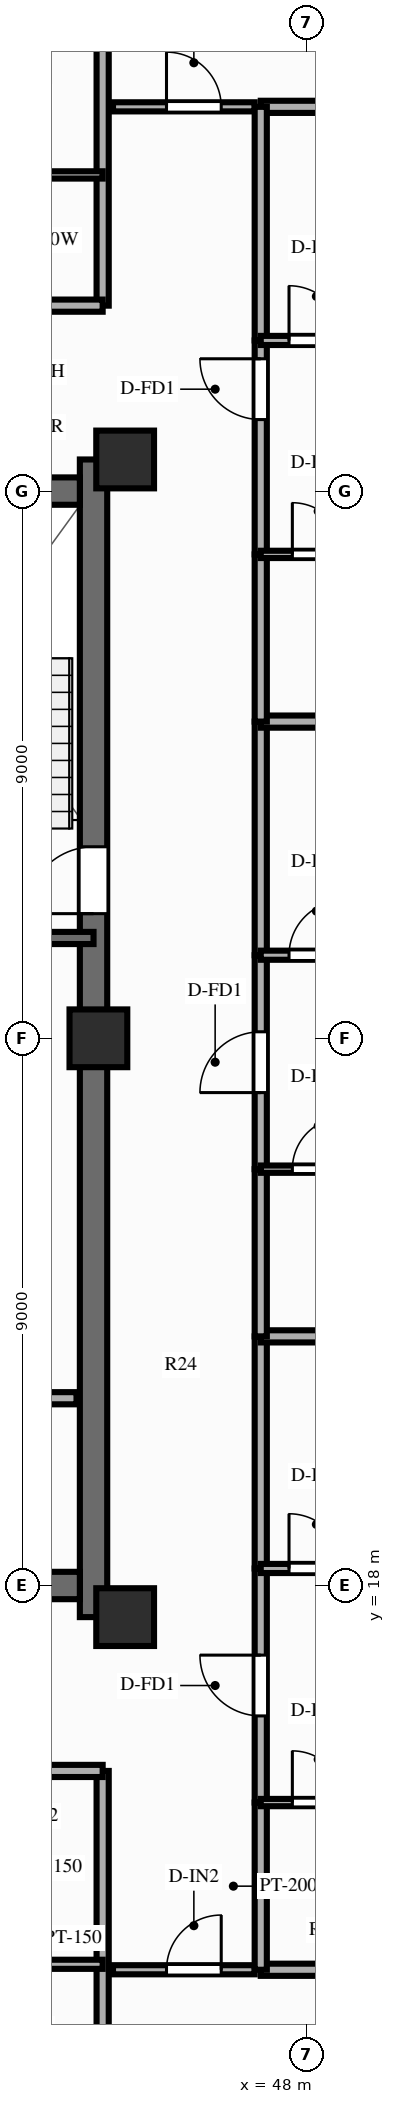
"""IFC4 building model, lengths in metres.
Left out: names, types, materials, properties, quantities, classifications, styles, units other than length and angle.
Written with IfcOpenShell. Run it as: python <this file> out.ifc"""

import sys

from ifc_helpers import new_model, si_unit, direction, frame, frame_2d, origin, origin_2d, place, context, subcontext, project, spatial, rectangle, extrude, source, transform, mapped, element, fill, save


model = new_model("IFC4")
c1 = context("Model", 3, precision=1e-05, world=origin(), true_north=direction((0.0, 1.0)))
c2 = subcontext(c1, "Body", "Model", "MODEL_VIEW")
j1 = project(units=[si_unit("LENGTHUNIT", "METRE"), si_unit("PLANEANGLEUNIT", "RADIAN")], contexts=[c1])
p1 = place(None, origin())
s1 = spatial("IfcSite", under=j1, at=p1, CompositionType="ELEMENT")
p2 = place(p1, origin())
s2 = spatial("IfcBuilding", under=s1, at=p2, CompositionType="ELEMENT")
p3 = place(p2, frame((0.0, 0.0, 216.3)))
s3 = spatial("IfcBuildingStorey", under=s2, at=p3, CompositionType="ELEMENT", Elevation=216.3)
p4 = place(p3, frame((44.5, 17.48, 0.0), z_axis=(0.0, 0.0, 1.0), x_axis=(0.0, 1.0, 0.0)))
e1 = element("IfcWall", 1, at=p4, inside=s3, PredefinedType="SHEAR", context=c2, shape_type="SweptSolid", body=[
    extrude(rectangle(XDim=19.04, YDim=0.45, at=frame_2d((9.52, 0.0))), origin(), (0.0, 0.0, 1.0), 3.9),
])
p5 = place(p4, frame((12.67, 0.0, 0.0), z_axis=(0.0, 0.0, 1.0), x_axis=(-1.0, 0.0, 0.0)))
e2 = element("IfcOpeningElement", 2, at=p5, cuts=e1, PredefinedType="OPENING", context=c2, shape_type="SweptSolid", body=[
    extrude(rectangle(XDim=1.1, YDim=2.15, at=frame_2d((0.55, 1.075))), frame((0.0, 0.237, 0.0), z_axis=(0.0, -1.0, 0.0), x_axis=(1.0, 0.0, 0.0)), (0.0, 0.0, 1.0), 0.474),
])
p6 = place(p3, frame((31.725, 18.0, 0.0), z_axis=(0.0, 0.0, 1.0), x_axis=(1.0, 0.0, 0.0)))
e3 = element("IfcWall", 3, at=p6, inside=s3, PredefinedType="SHEAR", context=c2, shape_type="SweptSolid", body=[
    extrude(rectangle(XDim=12.55, YDim=0.45, at=frame_2d((6.275, 0.0))), origin(), (0.0, 0.0, 1.0), 3.9),
])
p7 = place(p3, frame((31.725, 36.0, 0.0), z_axis=(0.0, 0.0, 1.0), x_axis=(1.0, 0.0, 0.0)))
e4 = element("IfcWall", 4, at=p7, inside=s3, PredefinedType="SHEAR", context=c2, shape_type="SweptSolid", body=[
    extrude(rectangle(XDim=12.55, YDim=0.45, at=frame_2d((6.275, 0.0))), origin(), (0.0, 0.0, 1.0), 3.9),
])
p8 = place(p7, frame((5.225, 0.0, 0.0), z_axis=(0.0, 0.0, 1.0), x_axis=(-1.0, 0.0, 0.0)))
e5 = element("IfcOpeningElement", 5, at=p8, cuts=e4, PredefinedType="OPENING", context=c2, shape_type="SweptSolid", body=[
    extrude(rectangle(XDim=1.4, YDim=2.15, at=frame_2d((0.7, 1.075))), frame((0.0, 0.237, 0.0), z_axis=(0.0, -1.0, 0.0), x_axis=(1.0, 0.0, 0.0)), (0.0, 0.0, 1.0), 0.474),
])
m1 = source(origin(), c2, "Body", "SweptSolid", [
    extrude(rectangle(XDim=0.95, YDim=0.95, at=origin_2d()), origin(), (0.0, 0.0, 1.0), 3.9),
])
for number, where, z_axis, x_axis in (
    (6, (45.02, 17.48, 0.0), (0.0, 0.0, 1.0), (1.0, 0.0, 0.0)),
    (7, (45.02, 36.52, 0.0), (0.0, 0.0, 1.0), (1.0, 0.0, 0.0)),
    (8, (44.58, 27.0, 0.0), (0.0, 0.0, 1.0), (1.0, 0.0, 0.0)),
):
    element("IfcColumn", number, at=place(p3, frame(where, z_axis=z_axis, x_axis=x_axis)), inside=s3, PredefinedType="COLUMN", context=c2, shape_type="MappedRepresentation", body=[
        mapped(m1, transform((0.0, 0.0, 0.0), scale=1.0)),
    ])
p9 = place(p3, frame((42.88, 21.08, 0.0), z_axis=(0.0, 0.0, 1.0), x_axis=(1.0, 0.0, 0.0)))
e9 = element("IfcWall", 9, at=p9, inside=s3, PredefinedType="PARTITIONING", context=c2, shape_type="SweptSolid", body=[
    extrude(rectangle(XDim=1.34, YDim=0.2, at=frame_2d((0.67, 0.0))), origin(), (0.0, 0.0, 1.0), 3.56),
])
p10 = place(p3, frame((40.57, 28.65, 0.0), z_axis=(0.0, 0.0, 1.0), x_axis=(1.0, 0.0, 0.0)))
e10 = element("IfcWall", 10, at=p10, inside=s3, PredefinedType="SOLIDWALL", context=c2, shape_type="SweptSolid", body=[
    extrude(rectangle(XDim=3.93, YDim=0.2, at=frame_2d((1.965, 0.0))), origin(), (0.0, 0.0, 1.0), 3.69),
])
p11 = place(p3, frame((44.82, 11.68, 0.0), z_axis=(0.0, 0.0, 1.0), x_axis=(1.0, 0.0, 0.0)))
e11 = element("IfcWall", 11, at=p11, inside=s3, PredefinedType="PARTITIONING", context=c2, shape_type="SweptSolid", body=[
    extrude(rectangle(XDim=2.33, YDim=0.15, at=frame_2d((1.165, 0.0))), origin(), (0.0, 0.0, 1.0), 2.24),
])
p12 = place(p11, frame((0.88, 0.0, 0.0)))
e12 = element("IfcOpeningElement", 12, at=p12, cuts=e11, PredefinedType="OPENING", context=c2, shape_type="SweptSolid", body=[
    extrude(rectangle(XDim=0.9, YDim=2.1, at=frame_2d((0.45, 1.05))), frame((0.0, 0.087, 0.0), z_axis=(0.0, -1.0, 0.0), x_axis=(1.0, 0.0, 0.0)), (0.0, 0.0, 1.0), 0.174),
])
p13 = place(p3, frame((44.82, 42.32, 0.0), z_axis=(0.0, 0.0, 1.0), x_axis=(1.0, 0.0, 0.0)))
e13 = element("IfcWall", 13, at=p13, inside=s3, PredefinedType="PARTITIONING", context=c2, shape_type="SweptSolid", body=[
    extrude(rectangle(XDim=2.33, YDim=0.15, at=frame_2d((1.165, 0.0))), origin(), (0.0, 0.0, 1.0), 2.24),
])
p14 = place(p13, frame((0.88, 0.0, 0.0)))
e14 = element("IfcOpeningElement", 14, at=p14, cuts=e13, PredefinedType="OPENING", context=c2, shape_type="SweptSolid", body=[
    extrude(rectangle(XDim=0.9, YDim=2.1, at=frame_2d((0.45, 1.05))), frame((0.0, 0.087, 0.0), z_axis=(0.0, -1.0, 0.0), x_axis=(1.0, 0.0, 0.0)), (0.0, 0.0, 1.0), 0.174),
])
p15 = place(p3, frame((44.65, 14.95, 0.0), z_axis=(0.0, 0.0, 1.0), x_axis=(0.0, -1.0, 0.0)))
e15 = element("IfcWall", 15, at=p15, inside=s3, PredefinedType="PARTITIONING", context=c2, shape_type="SweptSolid", body=[
    extrude(rectangle(XDim=8.8, YDim=0.2, at=frame_2d((4.4, 0.0))), origin(), (0.0, 0.0, 1.0), 2.44),
])
p16 = place(p3, frame((41.87, 14.95, 0.0), z_axis=(0.0, 0.0, 1.0), x_axis=(1.0, 0.0, 0.0)))
e16 = element("IfcWall", 16, at=p16, inside=s3, PredefinedType="PARTITIONING", context=c2, shape_type="SweptSolid", body=[
    extrude(rectangle(XDim=2.78, YDim=0.2, at=frame_2d((1.39, 0.0))), origin(), (0.0, 0.0, 1.0), 3.56),
])
p17 = place(p3, frame((41.87, 11.77, 0.0), z_axis=(0.0, 0.0, 1.0), x_axis=(1.0, 0.0, 0.0)))
e17 = element("IfcWall", 17, at=p17, inside=s3, PredefinedType="PARTITIONING", context=c2, shape_type="SweptSolid", body=[
    extrude(rectangle(XDim=2.78, YDim=0.15, at=frame_2d((1.39, 0.0))), origin(), (0.0, 0.0, 1.0), 3.39),
])
p18 = place(p3, frame((44.65, 39.05, 0.0), z_axis=(0.0, 0.0, 1.0), x_axis=(0.0, 1.0, 0.0)))
e18 = element("IfcWall", 18, at=p18, inside=s3, PredefinedType="PARTITIONING", context=c2, shape_type="SweptSolid", body=[
    extrude(rectangle(XDim=8.8, YDim=0.2, at=frame_2d((4.4, 0.0))), origin(), (0.0, 0.0, 1.0), 2.44),
])
p19 = place(p3, frame((42.342, 39.05, 0.0), z_axis=(0.0, 0.0, 1.0), x_axis=(1.0, 0.0, 0.0)))
e19 = element("IfcWall", 19, at=p19, inside=s3, PredefinedType="PARTITIONING", context=c2, shape_type="SweptSolid", body=[
    extrude(rectangle(XDim=2.308, YDim=0.2, at=frame_2d((1.154, 0.0))), origin(), (0.0, 0.0, 1.0), 3.56),
])
p20 = place(p3, frame((42.342, 41.2, 0.0), z_axis=(0.0, 0.0, 1.0), x_axis=(1.0, 0.0, 0.0)))
e20 = element("IfcWall", 20, at=p20, inside=s3, PredefinedType="PARTITIONING", context=c2, shape_type="SweptSolid", body=[
    extrude(rectangle(XDim=2.308, YDim=0.12, at=frame_2d((1.154, 0.0))), origin(), (0.0, 0.0, 1.0), 3.56),
])
for number, where, z_axis, x_axis in (
    (21, (47.25, 11.68, 0.0), (0.0, 0.0, 1.0), (1.0, 0.0, 0.0)),
    (22, (47.25, 42.32, 0.0), (0.0, 0.0, 1.0), (1.0, 0.0, 0.0)),
):
    element("IfcWall", number, at=place(p3, frame(where, z_axis=z_axis, x_axis=x_axis)), inside=s3, PredefinedType="PARTITIONING", context=c2, shape_type="SweptSolid", body=[
        extrude(rectangle(XDim=9.1, YDim=0.2, at=frame_2d((4.55, 0.0))), origin(), (0.0, 0.0, 1.0), 2.24),
    ])
p21 = place(p3, frame((47.25, 11.68, 0.0), z_axis=(0.0, 0.0, 1.0), x_axis=(0.0, 1.0, 0.0)))
e23 = element("IfcWall", 23, at=p21, inside=s3, PredefinedType="PARTITIONING", context=c2, shape_type="SweptSolid", body=[
    extrude(rectangle(XDim=2.75, YDim=0.2, at=frame_2d((1.375, 0.0))), origin(), (0.0, 0.0, 1.0), 3.56),
])
p22 = place(p3, frame((47.25, 14.43, 0.0), z_axis=(0.0, 0.0, 1.0), x_axis=(0.0, 1.0, 0.0)))
e24 = element("IfcWall", 24, at=p22, inside=s3, PredefinedType="PARTITIONING", context=c2, shape_type="SweptSolid", body=[
    extrude(rectangle(XDim=3.85, YDim=0.2, at=frame_2d((1.925, 0.0))), origin(), (0.0, 0.0, 1.0), 3.56),
])
p23 = place(p22, frame((1.425, 0.0, 0.0)))
e25 = element("IfcOpeningElement", 25, at=p23, cuts=e24, PredefinedType="OPENING", context=c2, shape_type="SweptSolid", body=[
    extrude(rectangle(XDim=1.0, YDim=2.15, at=frame_2d((0.5, 1.075))), frame((0.0, 0.112, 0.0), z_axis=(0.0, -1.0, 0.0), x_axis=(1.0, 0.0, 0.0)), (0.0, 0.0, 1.0), 0.224),
])
p24 = place(p3, frame((47.25, 18.28, 0.0), z_axis=(0.0, 0.0, 1.0), x_axis=(0.0, 1.0, 0.0)))
e26 = element("IfcWall", 26, at=p24, inside=s3, PredefinedType="PARTITIONING", context=c2, shape_type="SweptSolid", body=[
    extrude(rectangle(XDim=3.818, YDim=0.2, at=frame_2d((1.909, 0.0))), origin(), (0.0, 0.0, 1.0), 3.56),
])
p25 = place(p3, frame((47.25, 14.43, 0.0), z_axis=(0.0, 0.0, 1.0), x_axis=(1.0, 0.0, 0.0)))
e27 = element("IfcWall", 27, at=p25, inside=s3, PredefinedType="PARTITIONING", context=c2, shape_type="SweptSolid", body=[
    extrude(rectangle(XDim=2.12, YDim=0.12, at=frame_2d((1.06, 0.0))), origin(), (0.0, 0.0, 1.0), 3.56),
])
p26 = place(p25, frame((0.52, 0.0, 0.0)))
e28 = element("IfcOpeningElement", 28, at=p26, cuts=e27, PredefinedType="OPENING", context=c2, shape_type="SweptSolid", body=[
    extrude(rectangle(XDim=0.85, YDim=2.05, at=frame_2d((0.425, 1.025))), frame((0.0, 0.072, 0.0), z_axis=(0.0, -1.0, 0.0), x_axis=(1.0, 0.0, 0.0)), (0.0, 0.0, 1.0), 0.144),
])
p27 = place(p3, frame((47.25, 18.28, 0.0), z_axis=(0.0, 0.0, 1.0), x_axis=(1.0, 0.0, 0.0)))
e29 = element("IfcWall", 29, at=p27, inside=s3, PredefinedType="PARTITIONING", context=c2, shape_type="SweptSolid", body=[
    extrude(rectangle(XDim=2.46, YDim=0.15, at=frame_2d((1.23, 0.0))), origin(), (0.0, 0.0, 1.0), 3.56),
])
p28 = place(p27, frame((0.465, 0.0, 0.0)))
e30 = element("IfcOpeningElement", 30, at=p28, cuts=e29, PredefinedType="OPENING", context=c2, shape_type="SweptSolid", body=[
    extrude(rectangle(XDim=0.9, YDim=2.1, at=frame_2d((0.45, 1.05))), frame((0.0, 0.087, 0.0), z_axis=(0.0, -1.0, 0.0), x_axis=(1.0, 0.0, 0.0)), (0.0, 0.0, 1.0), 0.174),
])
p29 = place(p3, frame((47.25, 22.098, 0.0), z_axis=(0.0, 0.0, 1.0), x_axis=(1.0, 0.0, 0.0)))
e31 = element("IfcWall", 31, at=p29, inside=s3, PredefinedType="PARTITIONING", context=c2, shape_type="SweptSolid", body=[
    extrude(rectangle(XDim=9.1, YDim=0.2, at=frame_2d((4.55, 0.0))), origin(), (0.0, 0.0, 1.0), 3.29),
])
p30 = place(p3, frame((47.25, 22.098, 0.0), z_axis=(0.0, 0.0, 1.0), x_axis=(0.0, 1.0, 0.0)))
e32 = element("IfcWall", 32, at=p30, inside=s3, PredefinedType="PARTITIONING", context=c2, shape_type="SweptSolid", body=[
    extrude(rectangle(XDim=2.75, YDim=0.2, at=frame_2d((1.375, 0.0))), origin(), (0.0, 0.0, 1.0), 3.56),
])
p31 = place(p3, frame((47.25, 24.848, 0.0), z_axis=(0.0, 0.0, 1.0), x_axis=(0.0, 1.0, 0.0)))
e33 = element("IfcWall", 33, at=p31, inside=s3, PredefinedType="PARTITIONING", context=c2, shape_type="SweptSolid", body=[
    extrude(rectangle(XDim=3.519, YDim=0.2, at=frame_2d((1.759, 0.0))), origin(), (0.0, 0.0, 1.0), 3.56),
])
p32 = place(p31, frame((1.26, 0.0, 0.0)))
e34 = element("IfcOpeningElement", 34, at=p32, cuts=e33, PredefinedType="OPENING", context=c2, shape_type="SweptSolid", body=[
    extrude(rectangle(XDim=1.0, YDim=2.15, at=frame_2d((0.5, 1.075))), frame((0.0, 0.112, 0.0), z_axis=(0.0, -1.0, 0.0), x_axis=(1.0, 0.0, 0.0)), (0.0, 0.0, 1.0), 0.224),
])
p33 = place(p3, frame((47.25, 28.366, 0.0), z_axis=(0.0, 0.0, 1.0), x_axis=(0.0, 1.0, 0.0)))
e35 = element("IfcWall", 35, at=p33, inside=s3, PredefinedType="PARTITIONING", context=c2, shape_type="SweptSolid", body=[
    extrude(rectangle(XDim=3.842, YDim=0.2, at=frame_2d((1.921, 0.0))), origin(), (0.0, 0.0, 1.0), 3.56),
])
p34 = place(p3, frame((47.25, 24.848, 0.0), z_axis=(0.0, 0.0, 1.0), x_axis=(1.0, 0.0, 0.0)))
e36 = element("IfcWall", 36, at=p34, inside=s3, PredefinedType="PARTITIONING", context=c2, shape_type="SweptSolid", body=[
    extrude(rectangle(XDim=2.12, YDim=0.12, at=frame_2d((1.06, 0.0))), origin(), (0.0, 0.0, 1.0), 3.56),
])
p35 = place(p34, frame((0.52, 0.0, 0.0)))
e37 = element("IfcOpeningElement", 37, at=p35, cuts=e36, PredefinedType="OPENING", context=c2, shape_type="SweptSolid", body=[
    extrude(rectangle(XDim=0.85, YDim=2.05, at=frame_2d((0.425, 1.025))), frame((0.0, 0.072, 0.0), z_axis=(0.0, -1.0, 0.0), x_axis=(1.0, 0.0, 0.0)), (0.0, 0.0, 1.0), 0.144),
])
p36 = place(p3, frame((47.25, 28.366, 0.0), z_axis=(0.0, 0.0, 1.0), x_axis=(1.0, 0.0, 0.0)))
e38 = element("IfcWall", 38, at=p36, inside=s3, PredefinedType="PARTITIONING", context=c2, shape_type="SweptSolid", body=[
    extrude(rectangle(XDim=2.46, YDim=0.15, at=frame_2d((1.23, 0.0))), origin(), (0.0, 0.0, 1.0), 3.56),
])
p37 = place(p36, frame((0.465, 0.0, 0.0)))
e39 = element("IfcOpeningElement", 39, at=p37, cuts=e38, PredefinedType="OPENING", context=c2, shape_type="SweptSolid", body=[
    extrude(rectangle(XDim=0.9, YDim=2.1, at=frame_2d((0.45, 1.05))), frame((0.0, 0.087, 0.0), z_axis=(0.0, -1.0, 0.0), x_axis=(1.0, 0.0, 0.0)), (0.0, 0.0, 1.0), 0.174),
])
p38 = place(p3, frame((47.25, 32.209, 0.0), z_axis=(0.0, 0.0, 1.0), x_axis=(1.0, 0.0, 0.0)))
e40 = element("IfcWall", 40, at=p38, inside=s3, PredefinedType="PARTITIONING", context=c2, shape_type="SweptSolid", body=[
    extrude(rectangle(XDim=9.1, YDim=0.2, at=frame_2d((4.55, 0.0))), origin(), (0.0, 0.0, 1.0), 3.29),
])
p39 = place(p3, frame((47.25, 32.209, 0.0), z_axis=(0.0, 0.0, 1.0), x_axis=(0.0, 1.0, 0.0)))
e41 = element("IfcWall", 41, at=p39, inside=s3, PredefinedType="PARTITIONING", context=c2, shape_type="SweptSolid", body=[
    extrude(rectangle(XDim=2.75, YDim=0.2, at=frame_2d((1.375, 0.0))), origin(), (0.0, 0.0, 1.0), 3.56),
])
p40 = place(p3, frame((47.25, 34.959, 0.0), z_axis=(0.0, 0.0, 1.0), x_axis=(0.0, 1.0, 0.0)))
e42 = element("IfcWall", 42, at=p40, inside=s3, PredefinedType="PARTITIONING", context=c2, shape_type="SweptSolid", body=[
    extrude(rectangle(XDim=3.519, YDim=0.2, at=frame_2d((1.76, 0.0))), origin(), (0.0, 0.0, 1.0), 3.56),
])
p41 = place(p40, frame((2.217, 0.0, 0.0)))
e43 = element("IfcOpeningElement", 43, at=p41, cuts=e42, PredefinedType="OPENING", context=c2, shape_type="SweptSolid", body=[
    extrude(rectangle(XDim=1.0, YDim=2.15, at=frame_2d((0.5, 1.075))), frame((0.0, 0.112, 0.0), z_axis=(0.0, -1.0, 0.0), x_axis=(1.0, 0.0, 0.0)), (0.0, 0.0, 1.0), 0.224),
])
p42 = place(p3, frame((47.25, 38.478, 0.0), z_axis=(0.0, 0.0, 1.0), x_axis=(0.0, 1.0, 0.0)))
e44 = element("IfcWall", 44, at=p42, inside=s3, PredefinedType="PARTITIONING", context=c2, shape_type="SweptSolid", body=[
    extrude(rectangle(XDim=3.842, YDim=0.2, at=frame_2d((1.921, 0.0))), origin(), (0.0, 0.0, 1.0), 3.56),
])
p43 = place(p3, frame((47.25, 34.959, 0.0), z_axis=(0.0, 0.0, 1.0), x_axis=(1.0, 0.0, 0.0)))
e45 = element("IfcWall", 45, at=p43, inside=s3, PredefinedType="PARTITIONING", context=c2, shape_type="SweptSolid", body=[
    extrude(rectangle(XDim=2.12, YDim=0.12, at=frame_2d((1.06, 0.0))), origin(), (0.0, 0.0, 1.0), 3.56),
])
p44 = place(p43, frame((0.52, 0.0, 0.0)))
e46 = element("IfcOpeningElement", 46, at=p44, cuts=e45, PredefinedType="OPENING", context=c2, shape_type="SweptSolid", body=[
    extrude(rectangle(XDim=0.85, YDim=2.05, at=frame_2d((0.425, 1.025))), frame((0.0, 0.072, 0.0), z_axis=(0.0, -1.0, 0.0), x_axis=(1.0, 0.0, 0.0)), (0.0, 0.0, 1.0), 0.144),
])
p45 = place(p3, frame((47.25, 38.478, 0.0), z_axis=(0.0, 0.0, 1.0), x_axis=(1.0, 0.0, 0.0)))
e47 = element("IfcWall", 47, at=p45, inside=s3, PredefinedType="PARTITIONING", context=c2, shape_type="SweptSolid", body=[
    extrude(rectangle(XDim=2.46, YDim=0.15, at=frame_2d((1.23, 0.0))), origin(), (0.0, 0.0, 1.0), 3.56),
])
p46 = place(p45, frame((0.465, 0.0, 0.0)))
e48 = element("IfcOpeningElement", 48, at=p46, cuts=e47, PredefinedType="OPENING", context=c2, shape_type="SweptSolid", body=[
    extrude(rectangle(XDim=0.9, YDim=2.1, at=frame_2d((0.45, 1.05))), frame((0.0, 0.087, 0.0), z_axis=(0.0, -1.0, 0.0), x_axis=(1.0, 0.0, 0.0)), (0.0, 0.0, 1.0), 0.174),
])
m2 = source(origin(), c2, "Body", "SweptSolid", [
    extrude(rectangle(XDim=1.1, YDim=2.15, at=frame_2d((0.55, 1.075))), frame((0.0, 0.025, 0.0), z_axis=(0.0, -1.0, 0.0), x_axis=(1.0, 0.0, 0.0)), (0.0, 0.0, 1.0), 0.05),
])
p47 = place(p5, origin())
e49 = element("IfcDoor", 49, at=p47, inside=s3, OperationType="SINGLE_SWING_RIGHT", PredefinedType="DOOR", context=c2, shape_type="MappedRepresentation", body=[
    mapped(m2, transform((0.0, 0.0, 0.0), scale=1.0)),
])
fill(e2, e49)
m3 = source(origin(), c2, "Body", "SweptSolid", [
    extrude(rectangle(XDim=0.9, YDim=2.1, at=frame_2d((0.45, 1.05))), frame((0.0, 0.025, 0.0), z_axis=(0.0, -1.0, 0.0), x_axis=(1.0, 0.0, 0.0)), (0.0, 0.0, 1.0), 0.05),
])
p48 = place(p12, origin())
e50 = element("IfcDoor", 50, at=p48, inside=s3, OperationType="SINGLE_SWING_RIGHT", PredefinedType="DOOR", context=c2, shape_type="MappedRepresentation", body=[
    mapped(m3, transform((0.0, 0.0, 0.0), scale=1.0)),
])
fill(e12, e50)
p49 = place(p14, origin())
e51 = element("IfcDoor", 51, at=p49, inside=s3, OperationType="SINGLE_SWING_LEFT", PredefinedType="DOOR", context=c2, shape_type="MappedRepresentation", body=[
    mapped(m3, transform((0.0, 0.0, 0.0), scale=1.0)),
])
fill(e14, e51)
m4 = source(origin(), c2, "Body", "SweptSolid", [
    extrude(rectangle(XDim=1.0, YDim=2.15, at=frame_2d((0.5, 1.075))), frame((0.0, 0.025, 0.0), z_axis=(0.0, -1.0, 0.0), x_axis=(1.0, 0.0, 0.0)), (0.0, 0.0, 1.0), 0.05),
])
p50 = place(p23, origin())
e52 = element("IfcDoor", 52, at=p50, inside=s3, OperationType="SINGLE_SWING_RIGHT", PredefinedType="DOOR", context=c2, shape_type="MappedRepresentation", body=[
    mapped(m4, transform((0.0, 0.0, 0.0), scale=1.0)),
])
fill(e25, e52)
m5 = source(origin(), c2, "Body", "SweptSolid", [
    extrude(rectangle(XDim=0.85, YDim=2.05, at=frame_2d((0.425, 1.025))), frame((0.0, 0.025, 0.0), z_axis=(0.0, -1.0, 0.0), x_axis=(1.0, 0.0, 0.0)), (0.0, 0.0, 1.0), 0.05),
])
p51 = place(p26, origin())
e53 = element("IfcDoor", 53, at=p51, inside=s3, OperationType="SINGLE_SWING_LEFT", PredefinedType="DOOR", context=c2, shape_type="MappedRepresentation", body=[
    mapped(m5, transform((0.0, 0.0, 0.0), scale=1.0)),
])
fill(e28, e53)
p52 = place(p28, origin())
e54 = element("IfcDoor", 54, at=p52, inside=s3, OperationType="SINGLE_SWING_LEFT", PredefinedType="DOOR", context=c2, shape_type="MappedRepresentation", body=[
    mapped(m3, transform((0.0, 0.0, 0.0), scale=1.0)),
])
fill(e30, e54)
p53 = place(p32, origin())
e55 = element("IfcDoor", 55, at=p53, inside=s3, OperationType="SINGLE_SWING_LEFT", PredefinedType="DOOR", context=c2, shape_type="MappedRepresentation", body=[
    mapped(m4, transform((0.0, 0.0, 0.0), scale=1.0)),
])
fill(e34, e55)
p54 = place(p35, origin())
e56 = element("IfcDoor", 56, at=p54, inside=s3, OperationType="SINGLE_SWING_RIGHT", PredefinedType="DOOR", context=c2, shape_type="MappedRepresentation", body=[
    mapped(m5, transform((0.0, 0.0, 0.0), scale=1.0)),
])
fill(e37, e56)
p55 = place(p37, origin())
e57 = element("IfcDoor", 57, at=p55, inside=s3, OperationType="SINGLE_SWING_RIGHT", PredefinedType="DOOR", context=c2, shape_type="MappedRepresentation", body=[
    mapped(m3, transform((0.0, 0.0, 0.0), scale=1.0)),
])
fill(e39, e57)
p56 = place(p41, origin())
e58 = element("IfcDoor", 58, at=p56, inside=s3, OperationType="SINGLE_SWING_RIGHT", PredefinedType="DOOR", context=c2, shape_type="MappedRepresentation", body=[
    mapped(m4, transform((0.0, 0.0, 0.0), scale=1.0)),
])
fill(e43, e58)
p57 = place(p44, origin())
e59 = element("IfcDoor", 59, at=p57, inside=s3, OperationType="SINGLE_SWING_LEFT", PredefinedType="DOOR", context=c2, shape_type="MappedRepresentation", body=[
    mapped(m5, transform((0.0, 0.0, 0.0), scale=1.0)),
])
fill(e46, e59)
p58 = place(p46, origin())
e60 = element("IfcDoor", 60, at=p58, inside=s3, OperationType="SINGLE_SWING_LEFT", PredefinedType="DOOR", context=c2, shape_type="MappedRepresentation", body=[
    mapped(m3, transform((0.0, 0.0, 0.0), scale=1.0)),
])
fill(e48, e60)
save(model, sys.argv[1])
